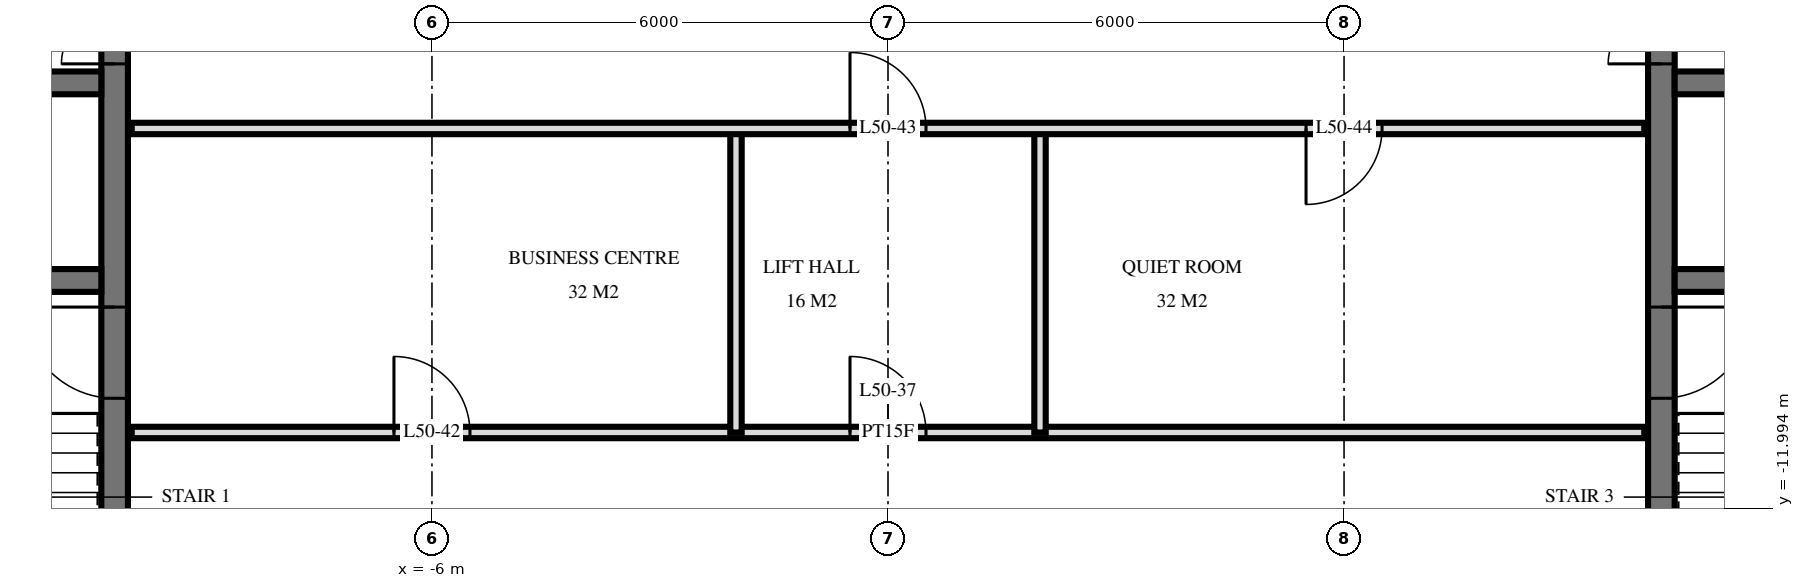
"""IFC4 building model, lengths in metres.
Left out: names, types, materials, properties, quantities, classifications, styles, units other than length and angle.
Written with IfcOpenShell. Run it as: python <this file> out.ifc"""

import sys

from ifc_helpers import new_model, si_unit, direction, frame, frame_2d, origin, place, context, subcontext, project, spatial, rectangle, extrude, element, fill, save


model = new_model("IFC4")
c1 = context("Model", 3, precision=1e-05, world=origin(), true_north=direction((0.0, 1.0)))
c2 = subcontext(c1, "Body", "Model", "MODEL_VIEW")
j1 = project(units=[si_unit("LENGTHUNIT", "METRE"), si_unit("PLANEANGLEUNIT", "RADIAN")], contexts=[c1])
p1 = place(None, origin())
s1 = spatial("IfcSite", under=j1, at=p1, CompositionType="ELEMENT")
p2 = place(p1, origin())
s2 = spatial("IfcBuilding", under=s1, at=p2, CompositionType="ELEMENT")
p3 = place(p2, frame((0.0, 0.0, 194.1)))
s3 = spatial("IfcBuildingStorey", under=s2, at=p3, CompositionType="ELEMENT", Elevation=194.1)
p4 = place(p3, frame((-10.175, -14.55, 0.0), z_axis=(0.0, 0.0, 1.0), x_axis=(0.0, 1.0, 0.0)))
e1 = element("IfcWall", 1, at=p4, inside=s3, PredefinedType="SHEAR", context=c2, shape_type="SweptSolid", body=[
    extrude(rectangle(XDim=14.1, YDim=0.35, at=frame_2d((7.05, 0.0))), origin(), (0.0, 0.0, 1.0), 3.5),
])
p5 = place(p4, frame((8.4, 0.0, 0.0)))
e2 = element("IfcOpeningElement", 2, at=p5, cuts=e1, PredefinedType="OPENING", context=c2, shape_type="SweptSolid", body=[
    extrude(rectangle(XDim=1.4, YDim=2.4, at=frame_2d((0.7, 1.2))), frame((0.0, 0.185, 0.0), z_axis=(0.0, -1.0, 0.0), x_axis=(1.0, 0.0, 0.0)), (0.0, 0.0, 1.0), 0.37),
])
p6 = place(p4, frame((10.0, 0.0, 0.0)))
e3 = element("IfcOpeningElement", 3, at=p6, cuts=e1, PredefinedType="OPENING", context=c2, shape_type="SweptSolid", body=[
    extrude(rectangle(XDim=1.4, YDim=2.4, at=frame_2d((0.7, 1.2))), frame((0.0, 0.185, 0.0), z_axis=(0.0, -1.0, 0.0), x_axis=(1.0, 0.0, 0.0)), (0.0, 0.0, 1.0), 0.37),
])
p7 = place(p4, frame((4.0, 0.0, 0.0)))
e4 = element("IfcOpeningElement", 4, at=p7, cuts=e1, PredefinedType="OPENING", context=c2, shape_type="SweptSolid", body=[
    extrude(rectangle(XDim=1.2, YDim=2.1, at=frame_2d((0.6, 1.05))), frame((0.0, 0.185, 0.0), z_axis=(0.0, -1.0, 0.0), x_axis=(1.0, 0.0, 0.0)), (0.0, 0.0, 1.0), 0.37),
])
p8 = place(p3, frame((-24.05, -6.4, 0.0), z_axis=(0.0, 0.0, 1.0), x_axis=(1.0, 0.0, 0.0)))
e5 = element("IfcWall", 5, at=p8, inside=s3, PredefinedType="SHEAR", context=c2, shape_type="SweptSolid", body=[
    extrude(rectangle(XDim=13.7, YDim=0.3, at=frame_2d((6.85, 0.0))), origin(), (0.0, 0.0, 1.0), 3.5),
])
p9 = place(p8, frame((0.55, 0.0, 0.0)))
e6 = element("IfcOpeningElement", 6, at=p9, cuts=e5, PredefinedType="OPENING", context=c2, shape_type="SweptSolid", body=[
    extrude(rectangle(XDim=1.1, YDim=2.1, at=frame_2d((0.55, 1.05))), frame((0.0, 0.16, 0.0), z_axis=(0.0, -1.0, 0.0), x_axis=(1.0, 0.0, 0.0)), (0.0, 0.0, 1.0), 0.32),
])
p10 = place(p8, frame((5.8, 0.0, 0.0)))
e7 = element("IfcOpeningElement", 7, at=p10, cuts=e5, PredefinedType="OPENING", context=c2, shape_type="SweptSolid", body=[
    extrude(rectangle(XDim=1.1, YDim=2.1, at=frame_2d((0.55, 1.05))), frame((0.0, 0.16, 0.0), z_axis=(0.0, -1.0, 0.0), x_axis=(1.0, 0.0, 0.0)), (0.0, 0.0, 1.0), 0.32),
])
p11 = place(p3, frame((-24.05, -9.0, 0.0), z_axis=(0.0, 0.0, 1.0), x_axis=(1.0, 0.0, 0.0)))
e8 = element("IfcWall", 8, at=p11, inside=s3, PredefinedType="SHEAR", context=c2, shape_type="SweptSolid", body=[
    extrude(rectangle(XDim=13.7, YDim=0.3, at=frame_2d((6.85, 0.0))), origin(), (0.0, 0.0, 1.0), 3.5),
])
p12 = place(p11, frame((8.8, 0.0, 0.0)))
e9 = element("IfcOpeningElement", 9, at=p12, cuts=e8, PredefinedType="OPENING", context=c2, shape_type="SweptSolid", body=[
    extrude(rectangle(XDim=1.1, YDim=2.1, at=frame_2d((0.55, 1.05))), frame((0.0, 0.16, 0.0), z_axis=(0.0, -1.0, 0.0), x_axis=(1.0, 0.0, 0.0)), (0.0, 0.0, 1.0), 0.32),
])
p13 = place(p3, frame((10.175, -14.55, 0.0), z_axis=(0.0, 0.0, 1.0), x_axis=(0.0, 1.0, 0.0)))
e10 = element("IfcWall", 10, at=p13, inside=s3, PredefinedType="SHEAR", context=c2, shape_type="SweptSolid", body=[
    extrude(rectangle(XDim=14.1, YDim=0.35, at=frame_2d((7.05, 0.0))), origin(), (0.0, 0.0, 1.0), 3.5),
])
p14 = place(p13, frame((8.4, 0.0, 0.0)))
e11 = element("IfcOpeningElement", 11, at=p14, cuts=e10, PredefinedType="OPENING", context=c2, shape_type="SweptSolid", body=[
    extrude(rectangle(XDim=1.4, YDim=2.4, at=frame_2d((0.7, 1.2))), frame((0.0, 0.185, 0.0), z_axis=(0.0, -1.0, 0.0), x_axis=(1.0, 0.0, 0.0)), (0.0, 0.0, 1.0), 0.37),
])
p15 = place(p13, frame((10.0, 0.0, 0.0)))
e12 = element("IfcOpeningElement", 12, at=p15, cuts=e10, PredefinedType="OPENING", context=c2, shape_type="SweptSolid", body=[
    extrude(rectangle(XDim=1.4, YDim=2.4, at=frame_2d((0.7, 1.2))), frame((0.0, 0.185, 0.0), z_axis=(0.0, -1.0, 0.0), x_axis=(1.0, 0.0, 0.0)), (0.0, 0.0, 1.0), 0.37),
])
p16 = place(p13, frame((4.0, 0.0, 0.0)))
e13 = element("IfcOpeningElement", 13, at=p16, cuts=e10, PredefinedType="OPENING", context=c2, shape_type="SweptSolid", body=[
    extrude(rectangle(XDim=1.2, YDim=2.1, at=frame_2d((0.6, 1.05))), frame((0.0, 0.185, 0.0), z_axis=(0.0, -1.0, 0.0), x_axis=(1.0, 0.0, 0.0)), (0.0, 0.0, 1.0), 0.37),
])
p17 = place(p3, frame((10.35, -6.4, 0.0), z_axis=(0.0, 0.0, 1.0), x_axis=(1.0, 0.0, 0.0)))
e14 = element("IfcWall", 14, at=p17, inside=s3, PredefinedType="SHEAR", context=c2, shape_type="SweptSolid", body=[
    extrude(rectangle(XDim=13.7, YDim=0.3, at=frame_2d((6.85, 0.0))), origin(), (0.0, 0.0, 1.0), 3.5),
])
p18 = place(p17, frame((12.05, 0.0, 0.0)))
e15 = element("IfcOpeningElement", 15, at=p18, cuts=e14, PredefinedType="OPENING", context=c2, shape_type="SweptSolid", body=[
    extrude(rectangle(XDim=1.1, YDim=2.1, at=frame_2d((0.55, 1.05))), frame((0.0, 0.16, 0.0), z_axis=(0.0, -1.0, 0.0), x_axis=(1.0, 0.0, 0.0)), (0.0, 0.0, 1.0), 0.32),
])
p19 = place(p17, frame((6.8, 0.0, 0.0)))
e16 = element("IfcOpeningElement", 16, at=p19, cuts=e14, PredefinedType="OPENING", context=c2, shape_type="SweptSolid", body=[
    extrude(rectangle(XDim=1.1, YDim=2.1, at=frame_2d((0.55, 1.05))), frame((0.0, 0.16, 0.0), z_axis=(0.0, -1.0, 0.0), x_axis=(1.0, 0.0, 0.0)), (0.0, 0.0, 1.0), 0.32),
])
p20 = place(p3, frame((10.35, -9.0, 0.0), z_axis=(0.0, 0.0, 1.0), x_axis=(1.0, 0.0, 0.0)))
e17 = element("IfcWall", 17, at=p20, inside=s3, PredefinedType="SHEAR", context=c2, shape_type="SweptSolid", body=[
    extrude(rectangle(XDim=13.7, YDim=0.3, at=frame_2d((6.85, 0.0))), origin(), (0.0, 0.0, 1.0), 3.5),
])
p21 = place(p20, frame((3.8, 0.0, 0.0)))
e18 = element("IfcOpeningElement", 18, at=p21, cuts=e17, PredefinedType="OPENING", context=c2, shape_type="SweptSolid", body=[
    extrude(rectangle(XDim=1.1, YDim=2.1, at=frame_2d((0.55, 1.05))), frame((0.0, 0.16, 0.0), z_axis=(0.0, -1.0, 0.0), x_axis=(1.0, 0.0, 0.0)), (0.0, 0.0, 1.0), 0.32),
])
for number, where, z_axis, x_axis in (
    (19, (2.0, -11.0, 0.0), (0.0, 0.0, 1.0), (0.0, 1.0, 0.0)),
    (20, (-2.0, -11.0, 0.0), (0.0, 0.0, 1.0), (0.0, 1.0, 0.0)),
):
    element("IfcWall", number, at=place(p3, frame(where, z_axis=z_axis, x_axis=x_axis)), inside=s3, PredefinedType="PARTITIONING", context=c2, shape_type="SweptSolid", body=[
        extrude(rectangle(XDim=4.0, YDim=0.15, at=frame_2d((2.0, 0.0))), origin(), (0.0, 0.0, 1.0), 3.22),
    ])
p22 = place(p3, frame((-9.95, -11.0, 0.0), z_axis=(0.0, 0.0, 1.0), x_axis=(1.0, 0.0, 0.0)))
e21 = element("IfcWall", 21, at=p22, inside=s3, PredefinedType="PARTITIONING", context=c2, shape_type="SweptSolid", body=[
    extrude(rectangle(XDim=19.9, YDim=0.15, at=frame_2d((9.95, 0.0))), origin(), (0.0, 0.0, 1.0), 3.22),
])
p23 = place(p22, frame((9.45, 0.0, 0.0)))
e22 = element("IfcOpeningElement", 22, at=p23, cuts=e21, PredefinedType="OPENING", context=c2, shape_type="SweptSolid", body=[
    extrude(rectangle(XDim=1.0, YDim=2.1, at=frame_2d((0.5, 1.05))), frame((0.0, 0.085, 0.0), z_axis=(0.0, -1.0, 0.0), x_axis=(1.0, 0.0, 0.0)), (0.0, 0.0, 1.0), 0.17),
])
p24 = place(p22, frame((3.45, 0.0, 0.0)))
e23 = element("IfcOpeningElement", 23, at=p24, cuts=e21, PredefinedType="OPENING", context=c2, shape_type="SweptSolid", body=[
    extrude(rectangle(XDim=1.0, YDim=2.1, at=frame_2d((0.5, 1.05))), frame((0.0, 0.085, 0.0), z_axis=(0.0, -1.0, 0.0), x_axis=(1.0, 0.0, 0.0)), (0.0, 0.0, 1.0), 0.17),
])
p25 = place(p3, frame((-9.95, -7.0, 0.0), z_axis=(0.0, 0.0, 1.0), x_axis=(1.0, 0.0, 0.0)))
e24 = element("IfcWall", 24, at=p25, inside=s3, PredefinedType="PARTITIONING", context=c2, shape_type="SweptSolid", body=[
    extrude(rectangle(XDim=19.9, YDim=0.15, at=frame_2d((9.95, 0.0))), origin(), (0.0, 0.0, 1.0), 3.22),
])
p26 = place(p25, frame((9.45, 0.0, 0.0)))
e25 = element("IfcOpeningElement", 25, at=p26, cuts=e24, PredefinedType="OPENING", context=c2, shape_type="SweptSolid", body=[
    extrude(rectangle(XDim=1.0, YDim=2.1, at=frame_2d((0.5, 1.05))), frame((0.0, 0.085, 0.0), z_axis=(0.0, -1.0, 0.0), x_axis=(1.0, 0.0, 0.0)), (0.0, 0.0, 1.0), 0.17),
])
p27 = place(p25, frame((15.45, 0.0, 0.0)))
e26 = element("IfcOpeningElement", 26, at=p27, cuts=e24, PredefinedType="OPENING", context=c2, shape_type="SweptSolid", body=[
    extrude(rectangle(XDim=1.0, YDim=2.1, at=frame_2d((0.5, 1.05))), frame((0.0, 0.085, 0.0), z_axis=(0.0, -1.0, 0.0), x_axis=(1.0, 0.0, 0.0)), (0.0, 0.0, 1.0), 0.17),
])
p28 = place(p5, origin())
e27 = element("IfcDoor", 27, at=p28, inside=s3, OperationType="DOUBLE_DOOR_SINGLE_SWING", PredefinedType="DOOR", context=c2, shape_type="SweptSolid", body=[
    extrude(rectangle(XDim=1.4, YDim=2.4, at=frame_2d((0.7, 1.2))), frame((0.0, 0.025, 0.0), z_axis=(0.0, -1.0, 0.0), x_axis=(1.0, 0.0, 0.0)), (0.0, 0.0, 1.0), 0.05),
])
fill(e2, e27)
p29 = place(p7, origin())
e28 = element("IfcDoor", 28, at=p29, inside=s3, OperationType="SINGLE_SWING_LEFT", PredefinedType="DOOR", context=c2, shape_type="SweptSolid", body=[
    extrude(rectangle(XDim=1.2, YDim=2.1, at=frame_2d((0.6, 1.05))), frame((0.0, 0.025, 0.0), z_axis=(0.0, -1.0, 0.0), x_axis=(1.0, 0.0, 0.0)), (0.0, 0.0, 1.0), 0.05),
])
fill(e4, e28)
p30 = place(p14, origin())
e29 = element("IfcDoor", 29, at=p30, inside=s3, OperationType="DOUBLE_DOOR_SINGLE_SWING", PredefinedType="DOOR", context=c2, shape_type="SweptSolid", body=[
    extrude(rectangle(XDim=1.4, YDim=2.4, at=frame_2d((0.7, 1.2))), frame((0.0, 0.025, 0.0), z_axis=(0.0, -1.0, 0.0), x_axis=(1.0, 0.0, 0.0)), (0.0, 0.0, 1.0), 0.05),
])
fill(e11, e29)
p31 = place(p16, frame((0.6, 0.0, 0.0), z_axis=(0.0, 0.0, 1.0), x_axis=(-1.0, 0.0, 0.0)))
e30 = element("IfcDoor", 30, at=p31, inside=s3, OperationType="SINGLE_SWING_RIGHT", PredefinedType="DOOR", context=c2, shape_type="SweptSolid", body=[
    extrude(rectangle(XDim=1.2, YDim=2.1, at=frame_2d((0.0, 1.05))), frame((0.0, -0.025, 0.0), z_axis=(0.0, 1.0, 0.0), x_axis=(-1.0, 0.0, 0.0)), (0.0, 0.0, 1.0), 0.05),
])
fill(e13, e30)
p32 = place(p23, origin())
e31 = element("IfcDoor", 31, at=p32, inside=s3, OperationType="SINGLE_SWING_RIGHT", PredefinedType="DOOR", context=c2, shape_type="SweptSolid", body=[
    extrude(rectangle(XDim=1.0, YDim=2.1, at=frame_2d((0.5, 1.05))), frame((0.0, 0.025, 0.0), z_axis=(0.0, -1.0, 0.0), x_axis=(1.0, 0.0, 0.0)), (0.0, 0.0, 1.0), 0.05),
])
fill(e22, e31)
p33 = place(p24, origin())
e32 = element("IfcDoor", 32, at=p33, inside=s3, OperationType="SINGLE_SWING_RIGHT", PredefinedType="DOOR", context=c2, shape_type="SweptSolid", body=[
    extrude(rectangle(XDim=1.0, YDim=2.1, at=frame_2d((0.5, 1.05))), frame((0.0, 0.025, 0.0), z_axis=(0.0, -1.0, 0.0), x_axis=(1.0, 0.0, 0.0)), (0.0, 0.0, 1.0), 0.05),
])
fill(e23, e32)
p34 = place(p26, origin())
e33 = element("IfcDoor", 33, at=p34, inside=s3, OperationType="SINGLE_SWING_RIGHT", PredefinedType="DOOR", context=c2, shape_type="SweptSolid", body=[
    extrude(rectangle(XDim=1.0, YDim=2.1, at=frame_2d((0.5, 1.05))), frame((0.0, 0.025, 0.0), z_axis=(0.0, -1.0, 0.0), x_axis=(1.0, 0.0, 0.0)), (0.0, 0.0, 1.0), 0.05),
])
fill(e25, e33)
p35 = place(p27, frame((0.5, 0.0, 0.0), z_axis=(0.0, 0.0, 1.0), x_axis=(-1.0, 0.0, 0.0)))
e34 = element("IfcDoor", 34, at=p35, inside=s3, OperationType="SINGLE_SWING_LEFT", PredefinedType="DOOR", context=c2, shape_type="SweptSolid", body=[
    extrude(rectangle(XDim=1.0, YDim=2.1, at=frame_2d((0.0, 1.05))), frame((0.0, -0.025, 0.0), z_axis=(0.0, 1.0, 0.0), x_axis=(-1.0, 0.0, 0.0)), (0.0, 0.0, 1.0), 0.05),
])
fill(e26, e34)
save(model, sys.argv[1])
